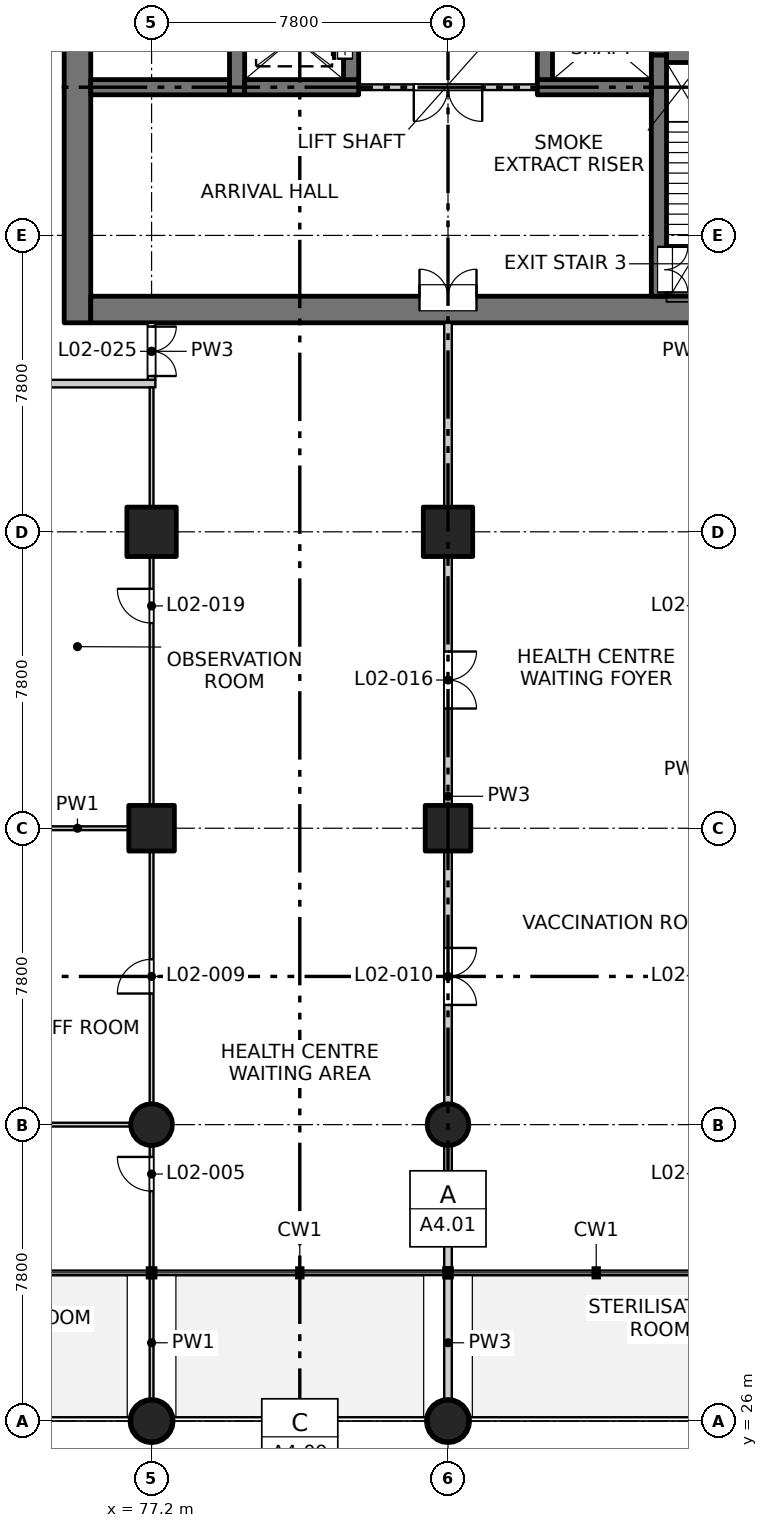
"""IFC4 building model, lengths in metres.
Left out: names, types, materials, properties, quantities, classifications, styles, units other than length and angle.
Written with IfcOpenShell. Run it as: python <this file> out.ifc"""

import sys

from ifc_helpers import new_model, si_unit, direction, frame, frame_2d, origin, origin_2d, place, context, subcontext, project, spatial, rectangle, circle, extrude, element, fill, save


model = new_model("IFC4")
c1 = context("Model", 3, precision=1e-05, world=origin(), true_north=direction((0.0, 1.0)))
c2 = subcontext(c1, "Body", "Model", "MODEL_VIEW")
j1 = project(units=[si_unit("LENGTHUNIT", "METRE"), si_unit("PLANEANGLEUNIT", "RADIAN")], contexts=[c1])
p1 = place(None, origin())
s1 = spatial("IfcSite", under=j1, at=p1, CompositionType="ELEMENT")
p2 = place(p1, origin())
s2 = spatial("IfcBuilding", under=s1, at=p2, CompositionType="ELEMENT")
p3 = place(p2, frame((0.0, 0.0, 10.5)))
s3 = spatial("IfcBuildingStorey", under=s2, at=p3, CompositionType="ELEMENT", Elevation=10.5)
for number, where, z_axis, x_axis in (
    (1, (77.2, 41.6, -0.3), (0.0, 0.0, 1.0), (1.0, 0.0, 0.0)),
    (2, (85.0, 41.6, -0.3), (0.0, 0.0, 1.0), (1.0, 0.0, 0.0)),
):
    element("IfcColumn", number, at=place(p3, frame(where, z_axis=z_axis, x_axis=x_axis)), inside=s3, PredefinedType="COLUMN", context=c2, shape_type="SweptSolid", body=[
        extrude(rectangle(XDim=1.2, YDim=1.2, at=origin_2d()), origin(), (0.0, 0.0, 1.0), 4.45),
    ])
for number, where, z_axis, x_axis in (
    (3, (77.2, 49.4, -0.3), (0.0, 0.0, 1.0), (1.0, 0.0, 0.0)),
    (4, (85.0, 49.4, -0.3), (0.0, 0.0, 1.0), (1.0, 0.0, 0.0)),
):
    element("IfcColumn", number, at=place(p3, frame(where, z_axis=z_axis, x_axis=x_axis)), inside=s3, PredefinedType="COLUMN", context=c2, shape_type="SweptSolid", body=[
        extrude(rectangle(XDim=1.3, YDim=1.3, at=origin_2d()), origin(), (0.0, 0.0, 1.0), 4.45),
    ])
for number, where, z_axis, x_axis in (
    (5, (77.2, 26.0, -0.3), (0.0, 0.0, 1.0), (1.0, 0.0, 0.0)),
    (6, (77.2, 33.8, -0.3), (0.0, 0.0, 1.0), (1.0, 0.0, 0.0)),
    (7, (85.0, 26.0, -0.3), (0.0, 0.0, 1.0), (1.0, 0.0, 0.0)),
    (8, (85.0, 33.8, -0.3), (0.0, 0.0, 1.0), (1.0, 0.0, 0.0)),
):
    element("IfcColumn", number, at=place(p3, frame(where, z_axis=z_axis, x_axis=x_axis)), inside=s3, PredefinedType="COLUMN", context=c2, shape_type="SweptSolid", body=[
        extrude(circle(Radius=0.55, at=origin_2d()), origin(), (0.0, 0.0, 1.0), 4.45),
    ])
p4 = place(p3, frame((75.25, 54.9, -0.3), z_axis=(0.0, 0.0, 1.0), x_axis=(0.0, 1.0, 0.0)))
e9 = element("IfcWall", 9, at=p4, inside=s3, PredefinedType="SOLIDWALL", context=c2, shape_type="SweptSolid", body=[
    extrude(rectangle(XDim=22.4, YDim=0.7, at=frame_2d((11.2, 0.0))), origin(), (0.0, 0.0, 1.0), 4.45),
])
p5 = place(p4, frame((7.55, 0.0, 0.3)))
e10 = element("IfcOpeningElement", 10, at=p5, cuts=e9, PredefinedType="OPENING", context=c2, shape_type="SweptSolid", body=[
    extrude(rectangle(XDim=0.9, YDim=2.1, at=frame_2d((0.45, 1.05))), frame((0.0, 0.36, 0.0), z_axis=(0.0, -1.0, 0.0), x_axis=(1.0, 0.0, 0.0)), (0.0, 0.0, 1.0), 0.72),
])
p6 = place(p4, frame((10.85, 0.0, 0.3)))
e11 = element("IfcOpeningElement", 11, at=p6, cuts=e9, PredefinedType="OPENING", context=c2, shape_type="SweptSolid", body=[
    extrude(rectangle(XDim=0.9, YDim=2.1, at=frame_2d((0.45, 1.05))), frame((0.0, 0.36, 0.0), z_axis=(0.0, -1.0, 0.0), x_axis=(1.0, 0.0, 0.0)), (0.0, 0.0, 1.0), 0.72),
])
p7 = place(p4, frame((13.85, 0.0, 0.3)))
e12 = element("IfcOpeningElement", 12, at=p7, cuts=e9, PredefinedType="OPENING", context=c2, shape_type="SweptSolid", body=[
    extrude(rectangle(XDim=0.9, YDim=2.1, at=frame_2d((0.45, 1.05))), frame((0.0, 0.36, 0.0), z_axis=(0.0, -1.0, 0.0), x_axis=(1.0, 0.0, 0.0)), (0.0, 0.0, 1.0), 0.72),
])
p8 = place(p4, frame((16.85, 0.0, 0.3)))
e13 = element("IfcOpeningElement", 13, at=p8, cuts=e9, PredefinedType="OPENING", context=c2, shape_type="SweptSolid", body=[
    extrude(rectangle(XDim=0.9, YDim=2.1, at=frame_2d((0.45, 1.05))), frame((0.0, 0.36, 0.0), z_axis=(0.0, -1.0, 0.0), x_axis=(1.0, 0.0, 0.0)), (0.0, 0.0, 1.0), 0.72),
])
p9 = place(p4, frame((20.15, 0.0, 0.3)))
e14 = element("IfcOpeningElement", 14, at=p9, cuts=e9, PredefinedType="OPENING", context=c2, shape_type="SweptSolid", body=[
    extrude(rectangle(XDim=0.9, YDim=2.1, at=frame_2d((0.45, 1.05))), frame((0.0, 0.36, 0.0), z_axis=(0.0, -1.0, 0.0), x_axis=(1.0, 0.0, 0.0)), (0.0, 0.0, 1.0), 0.72),
])
p10 = place(p3, frame((75.6, 55.25, -0.3), z_axis=(0.0, 0.0, 1.0), x_axis=(1.0, 0.0, 0.0)))
e15 = element("IfcWall", 15, at=p10, inside=s3, PredefinedType="SOLIDWALL", context=c2, shape_type="SweptSolid", body=[
    extrude(rectangle(XDim=18.8, YDim=0.7, at=frame_2d((9.4, 0.0))), origin(), (0.0, 0.0, 1.0), 4.45),
])
p11 = place(p10, frame((8.65, 0.0, 0.3)))
e16 = element("IfcOpeningElement", 16, at=p11, cuts=e15, PredefinedType="OPENING", context=c2, shape_type="SweptSolid", body=[
    extrude(rectangle(XDim=1.5, YDim=2.1, at=frame_2d((0.75, 1.05))), frame((0.0, 0.36, 0.0), z_axis=(0.0, -1.0, 0.0), x_axis=(1.0, 0.0, 0.0)), (0.0, 0.0, 1.0), 0.72),
])
p12 = place(p3, frame((79.45, 60.9, -0.3), z_axis=(0.0, 0.0, 1.0), x_axis=(0.0, 1.0, 0.0)))
e17 = element("IfcWall", 17, at=p12, inside=s3, PredefinedType="SOLIDWALL", context=c2, shape_type="SweptSolid", body=[
    extrude(rectangle(XDim=16.4, YDim=0.4, at=frame_2d((8.2, 0.0))), origin(), (0.0, 0.0, 1.0), 4.45),
])
p13 = place(p3, frame((90.55, 55.6, -0.3), z_axis=(0.0, 0.0, 1.0), x_axis=(0.0, 1.0, 0.0)))
e18 = element("IfcWall", 18, at=p13, inside=s3, PredefinedType="SOLIDWALL", context=c2, shape_type="SweptSolid", body=[
    extrude(rectangle(XDim=6.35, YDim=0.4, at=frame_2d((3.175, 0.0))), origin(), (0.0, 0.0, 1.0), 4.45),
])
p14 = place(p13, frame((0.1, 0.0, 0.3)))
e19 = element("IfcOpeningElement", 19, at=p14, cuts=e18, PredefinedType="OPENING", context=c2, shape_type="SweptSolid", body=[
    extrude(rectangle(XDim=1.2, YDim=2.1, at=frame_2d((0.6, 1.05))), frame((0.0, 0.21, 0.0), z_axis=(0.0, -1.0, 0.0), x_axis=(1.0, 0.0, 0.0)), (0.0, 0.0, 1.0), 0.42),
])
p15 = place(p3, frame((90.55, 61.95, -0.3), z_axis=(0.0, 0.0, 1.0), x_axis=(0.0, 1.0, 0.0)))
e20 = element("IfcWall", 20, at=p15, inside=s3, PredefinedType="SOLIDWALL", context=c2, shape_type="SweptSolid", body=[
    extrude(rectangle(XDim=15.35, YDim=0.4, at=frame_2d((7.675, 0.0))), origin(), (0.0, 0.0, 1.0), 4.45),
])
p16 = place(p3, frame((79.65, 61.1, -0.3), z_axis=(0.0, 0.0, 1.0), x_axis=(1.0, 0.0, 0.0)))
e21 = element("IfcWall", 21, at=p16, inside=s3, PredefinedType="SOLIDWALL", context=c2, shape_type="SweptSolid", body=[
    extrude(rectangle(XDim=3.0, YDim=0.4, at=frame_2d((1.5, 0.0))), origin(), (0.0, 0.0, 1.0), 4.45),
])
p17 = place(p3, frame((82.45, 61.3, -0.3), z_axis=(0.0, 0.0, 1.0), x_axis=(0.0, 1.0, 0.0)))
e22 = element("IfcWall", 22, at=p17, inside=s3, PredefinedType="SOLIDWALL", context=c2, shape_type="SweptSolid", body=[
    extrude(rectangle(XDim=2.2, YDim=0.4, at=frame_2d((1.1, 0.0))), origin(), (0.0, 0.0, 1.0), 4.45),
])
p18 = place(p17, frame((0.55, 0.0, 0.3)))
e23 = element("IfcOpeningElement", 23, at=p18, cuts=e22, PredefinedType="OPENING", context=c2, shape_type="SweptSolid", body=[
    extrude(rectangle(XDim=1.1, YDim=2.1, at=frame_2d((0.55, 1.05))), frame((0.0, 0.21, 0.0), z_axis=(0.0, -1.0, 0.0), x_axis=(1.0, 0.0, 0.0)), (0.0, 0.0, 1.0), 0.42),
])
p19 = place(p3, frame((87.35, 61.1, -0.3), z_axis=(0.0, 0.0, 1.0), x_axis=(1.0, 0.0, 0.0)))
e24 = element("IfcWall", 24, at=p19, inside=s3, PredefinedType="SOLIDWALL", context=c2, shape_type="SweptSolid", body=[
    extrude(rectangle(XDim=3.0, YDim=0.4, at=frame_2d((1.5, 0.0))), origin(), (0.0, 0.0, 1.0), 4.45),
])
p20 = place(p3, frame((87.55, 61.3, -0.3), z_axis=(0.0, 0.0, 1.0), x_axis=(0.0, 1.0, 0.0)))
e25 = element("IfcWall", 25, at=p20, inside=s3, PredefinedType="SOLIDWALL", context=c2, shape_type="SweptSolid", body=[
    extrude(rectangle(XDim=2.2, YDim=0.4, at=frame_2d((1.1, 0.0))), origin(), (0.0, 0.0, 1.0), 4.45),
])
for number, where, z_axis, x_axis in (
    (26, (75.6, 61.1, -0.3), (0.0, 0.0, 1.0), (1.0, 0.0, 0.0)),
    (27, (90.75, 61.95, -0.3), (0.0, 0.0, 1.0), (1.0, 0.0, 0.0)),
):
    element("IfcWall", number, at=place(p3, frame(where, z_axis=z_axis, x_axis=x_axis)), inside=s3, PredefinedType="SOLIDWALL", context=c2, shape_type="SweptSolid", body=[
        extrude(rectangle(XDim=3.65, YDim=0.4, at=frame_2d((1.825, 0.0))), origin(), (0.0, 0.0, 1.0), 4.45),
    ])
p21 = place(p3, frame((64.4, 33.8, 0.0), z_axis=(0.0, 0.0, 1.0), x_axis=(1.0, 0.0, 0.0)))
e28 = element("IfcWall", 28, at=p21, inside=s3, PredefinedType="PARTITIONING", context=c2, shape_type="SweptSolid", body=[
    extrude(rectangle(XDim=12.85, YDim=0.1, at=frame_2d((6.425, 0.0))), origin(), (0.0, 0.0, 1.0), 4.15),
])
p22 = place(p3, frame((73.25, 41.6, 0.0), z_axis=(0.0, 0.0, 1.0), x_axis=(1.0, 0.0, 0.0)))
e29 = element("IfcWall", 29, at=p22, inside=s3, PredefinedType="PARTITIONING", context=c2, shape_type="SweptSolid", body=[
    extrude(rectangle(XDim=4.0, YDim=0.1, at=frame_2d((2.0, 0.0))), origin(), (0.0, 0.0, 1.0), 3.7),
])
p23 = place(p3, frame((59.55, 53.3, 0.0), z_axis=(0.0, 0.0, 1.0), x_axis=(1.0, 0.0, 0.0)))
e30 = element("IfcWall", 30, at=p23, inside=s3, PredefinedType="PARTITIONING", context=c2, shape_type="SweptSolid", body=[
    extrude(rectangle(XDim=17.75, YDim=0.2, at=frame_2d((8.875, 0.0))), origin(), (0.0, 0.0, 1.0), 4.15),
])
p24 = place(p3, frame((82.65, 61.1, 0.0), z_axis=(0.0, 0.0, 1.0), x_axis=(1.0, 0.0, 0.0)))
e31 = element("IfcWall", 31, at=p24, inside=s3, PredefinedType="PARTITIONING", context=c2, shape_type="SweptSolid", body=[
    extrude(rectangle(XDim=4.7, YDim=0.15, at=frame_2d((2.35, 0.0))), origin(), (0.0, 0.0, 1.0), 4.15),
])
p25 = place(p24, frame((1.45, 0.0, 0.0)))
e32 = element("IfcOpeningElement", 32, at=p25, cuts=e31, PredefinedType="OPENING", context=c2, shape_type="SweptSolid", body=[
    extrude(rectangle(XDim=1.8, YDim=2.1, at=frame_2d((0.9, 1.05))), frame((0.0, 0.085, 0.0), z_axis=(0.0, -1.0, 0.0), x_axis=(1.0, 0.0, 0.0)), (0.0, 0.0, 1.0), 0.17),
])
p26 = place(p3, frame((77.2, 26.3, 0.0), z_axis=(0.0, 0.0, 1.0), x_axis=(0.0, 1.0, 0.0)))
e33 = element("IfcWall", 33, at=p26, inside=s3, PredefinedType="PARTITIONING", context=c2, shape_type="SweptSolid", body=[
    extrude(rectangle(XDim=3.52, YDim=0.1, at=frame_2d((1.76, 0.0))), origin(), (0.0, 0.0, 1.0), 4.15),
])
p27 = place(p3, frame((77.2, 29.98, 0.0), z_axis=(0.0, 0.0, 1.0), x_axis=(0.0, 1.0, 0.0)))
e34 = element("IfcWall", 34, at=p27, inside=s3, PredefinedType="PARTITIONING", context=c2, shape_type="SweptSolid", body=[
    extrude(rectangle(XDim=23.22, YDim=0.1, at=frame_2d((11.61, 0.0))), origin(), (0.0, 0.0, 1.0), 4.15),
])
p28 = place(p27, frame((2.07, 0.0, 0.0)))
e35 = element("IfcOpeningElement", 35, at=p28, cuts=e34, PredefinedType="OPENING", context=c2, shape_type="SweptSolid", body=[
    extrude(rectangle(XDim=0.9, YDim=2.1, at=frame_2d((0.45, 1.05))), frame((0.0, 0.06, 0.0), z_axis=(0.0, -1.0, 0.0), x_axis=(1.0, 0.0, 0.0)), (0.0, 0.0, 1.0), 0.12),
])
p29 = place(p27, frame((7.27, 0.0, 0.0)))
e36 = element("IfcOpeningElement", 36, at=p29, cuts=e34, PredefinedType="OPENING", context=c2, shape_type="SweptSolid", body=[
    extrude(rectangle(XDim=0.9, YDim=2.1, at=frame_2d((0.45, 1.05))), frame((0.0, 0.06, 0.0), z_axis=(0.0, -1.0, 0.0), x_axis=(1.0, 0.0, 0.0)), (0.0, 0.0, 1.0), 0.12),
])
p30 = place(p27, frame((17.02, 0.0, 0.0)))
e37 = element("IfcOpeningElement", 37, at=p30, cuts=e34, PredefinedType="OPENING", context=c2, shape_type="SweptSolid", body=[
    extrude(rectangle(XDim=0.9, YDim=2.1, at=frame_2d((0.45, 1.05))), frame((0.0, 0.06, 0.0), z_axis=(0.0, -1.0, 0.0), x_axis=(1.0, 0.0, 0.0)), (0.0, 0.0, 1.0), 0.12),
])
p31 = place(p3, frame((77.2, 53.4, 0.0), z_axis=(0.0, 0.0, 1.0), x_axis=(0.0, 1.0, 0.0)))
e38 = element("IfcWall", 38, at=p31, inside=s3, PredefinedType="PARTITIONING", context=c2, shape_type="SweptSolid", body=[
    extrude(rectangle(XDim=1.5, YDim=0.2, at=frame_2d((0.75, 0.0))), origin(), (0.0, 0.0, 1.0), 4.15),
])
p32 = place(p31, frame((0.1, 0.0, 0.0)))
e39 = element("IfcOpeningElement", 39, at=p32, cuts=e38, PredefinedType="OPENING", context=c2, shape_type="SweptSolid", body=[
    extrude(rectangle(XDim=1.3, YDim=2.1, at=frame_2d((0.65, 1.05))), frame((0.0, 0.11, 0.0), z_axis=(0.0, -1.0, 0.0), x_axis=(1.0, 0.0, 0.0)), (0.0, 0.0, 1.0), 0.22),
])
p33 = place(p3, frame((85.0, 26.3, 0.0), z_axis=(0.0, 0.0, 1.0), x_axis=(0.0, 1.0, 0.0)))
e40 = element("IfcWall", 40, at=p33, inside=s3, PredefinedType="PARTITIONING", context=c2, shape_type="SweptSolid", body=[
    extrude(rectangle(XDim=3.52, YDim=0.2, at=frame_2d((1.76, 0.0))), origin(), (0.0, 0.0, 1.0), 4.15),
])
p34 = place(p3, frame((85.0, 29.98, 0.0), z_axis=(0.0, 0.0, 1.0), x_axis=(0.0, 1.0, 0.0)))
e41 = element("IfcWall", 41, at=p34, inside=s3, PredefinedType="PARTITIONING", context=c2, shape_type="SweptSolid", body=[
    extrude(rectangle(XDim=24.92, YDim=0.2, at=frame_2d((12.46, 0.0))), origin(), (0.0, 0.0, 1.0), 4.15),
])
p35 = place(p34, frame((6.97, 0.0, 0.0)))
e42 = element("IfcOpeningElement", 42, at=p35, cuts=e41, PredefinedType="OPENING", context=c2, shape_type="SweptSolid", body=[
    extrude(rectangle(XDim=1.5, YDim=2.1, at=frame_2d((0.75, 1.05))), frame((0.0, 0.11, 0.0), z_axis=(0.0, -1.0, 0.0), x_axis=(1.0, 0.0, 0.0)), (0.0, 0.0, 1.0), 0.22),
])
p36 = place(p34, frame((14.77, 0.0, 0.0)))
e43 = element("IfcOpeningElement", 43, at=p36, cuts=e41, PredefinedType="OPENING", context=c2, shape_type="SweptSolid", body=[
    extrude(rectangle(XDim=1.5, YDim=2.1, at=frame_2d((0.75, 1.05))), frame((0.0, 0.11, 0.0), z_axis=(0.0, -1.0, 0.0), x_axis=(1.0, 0.0, 0.0)), (0.0, 0.0, 1.0), 0.22),
])
p37 = place(p28, origin())
e44 = element("IfcDoor", 44, at=p37, inside=s3, OperationType="SINGLE_SWING_RIGHT", PredefinedType="DOOR", context=c2, shape_type="SweptSolid", body=[
    extrude(rectangle(XDim=0.9, YDim=2.1, at=frame_2d((0.45, 1.05))), frame((0.0, 0.025, 0.0), z_axis=(0.0, -1.0, 0.0), x_axis=(1.0, 0.0, 0.0)), (0.0, 0.0, 1.0), 0.05),
])
fill(e35, e44)
p38 = place(p29, origin())
e45 = element("IfcDoor", 45, at=p38, inside=s3, OperationType="SINGLE_SWING_LEFT", PredefinedType="DOOR", context=c2, shape_type="SweptSolid", body=[
    extrude(rectangle(XDim=0.9, YDim=2.1, at=frame_2d((0.45, 1.05))), frame((0.0, 0.025, 0.0), z_axis=(0.0, -1.0, 0.0), x_axis=(1.0, 0.0, 0.0)), (0.0, 0.0, 1.0), 0.05),
])
fill(e36, e45)
p39 = place(p35, origin())
e46 = element("IfcDoor", 46, at=p39, inside=s3, OperationType="DOUBLE_DOOR_SINGLE_SWING", PredefinedType="DOOR", context=c2, shape_type="SweptSolid", body=[
    extrude(rectangle(XDim=1.5, YDim=2.1, at=frame_2d((0.75, 1.05))), frame((0.0, 0.025, 0.0), z_axis=(0.0, -1.0, 0.0), x_axis=(1.0, 0.0, 0.0)), (0.0, 0.0, 1.0), 0.05),
])
fill(e42, e46)
p40 = place(p36, origin())
e47 = element("IfcDoor", 47, at=p40, inside=s3, OperationType="DOUBLE_DOOR_SINGLE_SWING", PredefinedType="DOOR", context=c2, shape_type="SweptSolid", body=[
    extrude(rectangle(XDim=1.5, YDim=2.1, at=frame_2d((0.75, 1.05))), frame((0.0, 0.025, 0.0), z_axis=(0.0, -1.0, 0.0), x_axis=(1.0, 0.0, 0.0)), (0.0, 0.0, 1.0), 0.05),
])
fill(e43, e47)
p41 = place(p30, origin())
e48 = element("IfcDoor", 48, at=p41, inside=s3, OperationType="SINGLE_SWING_RIGHT", PredefinedType="DOOR", context=c2, shape_type="SweptSolid", body=[
    extrude(rectangle(XDim=0.9, YDim=2.1, at=frame_2d((0.45, 1.05))), frame((0.0, 0.025, 0.0), z_axis=(0.0, -1.0, 0.0), x_axis=(1.0, 0.0, 0.0)), (0.0, 0.0, 1.0), 0.05),
])
fill(e37, e48)
p42 = place(p32, origin())
e49 = element("IfcDoor", 49, at=p42, inside=s3, OperationType="DOUBLE_DOOR_SINGLE_SWING", PredefinedType="DOOR", context=c2, shape_type="SweptSolid", body=[
    extrude(rectangle(XDim=1.3, YDim=2.1, at=frame_2d((0.65, 1.05))), frame((0.0, 0.025, 0.0), z_axis=(0.0, -1.0, 0.0), x_axis=(1.0, 0.0, 0.0)), (0.0, 0.0, 1.0), 0.05),
])
fill(e39, e49)
p43 = place(p11, origin())
e50 = element("IfcDoor", 50, at=p43, inside=s3, OperationType="DOUBLE_DOOR_SINGLE_SWING", PredefinedType="DOOR", context=c2, shape_type="SweptSolid", body=[
    extrude(rectangle(XDim=1.5, YDim=2.1, at=frame_2d((0.75, 1.05))), frame((0.0, 0.335, 0.0), z_axis=(0.0, -1.0, 0.0), x_axis=(1.0, 0.0, 0.0)), (0.0, 0.0, 1.0), 0.05),
])
fill(e16, e50)
p44 = place(p14, origin())
e51 = element("IfcDoor", 51, at=p44, inside=s3, OperationType="DOUBLE_DOOR_SINGLE_SWING", PredefinedType="DOOR", context=c2, shape_type="SweptSolid", body=[
    extrude(rectangle(XDim=1.2, YDim=2.1, at=frame_2d((0.6, 1.05))), frame((0.0, -0.135, 0.0), z_axis=(0.0, -1.0, 0.0), x_axis=(1.0, 0.0, 0.0)), (0.0, 0.0, 1.0), 0.05),
])
fill(e19, e51)
p45 = place(p25, origin())
e52 = element("IfcDoor", 52, at=p45, inside=s3, OperationType="DOUBLE_DOOR_SINGLE_SWING", PredefinedType="DOOR", context=c2, shape_type="SweptSolid", body=[
    extrude(rectangle(XDim=1.8, YDim=2.1, at=frame_2d((0.9, 1.05))), frame((0.0, 0.025, 0.0), z_axis=(0.0, -1.0, 0.0), x_axis=(1.0, 0.0, 0.0)), (0.0, 0.0, 1.0), 0.05),
])
fill(e32, e52)
p46 = place(p18, origin())
e53 = element("IfcDoor", 53, at=p46, inside=s3, OperationType="SLIDING_TO_RIGHT", PredefinedType="DOOR", context=c2, shape_type="SweptSolid", body=[
    extrude(rectangle(XDim=1.1, YDim=2.1, at=frame_2d((0.55, 1.05))), frame((0.0, 0.185, 0.0), z_axis=(0.0, -1.0, 0.0), x_axis=(1.0, 0.0, 0.0)), (0.0, 0.0, 1.0), 0.05),
])
fill(e23, e53)
save(model, sys.argv[1])
